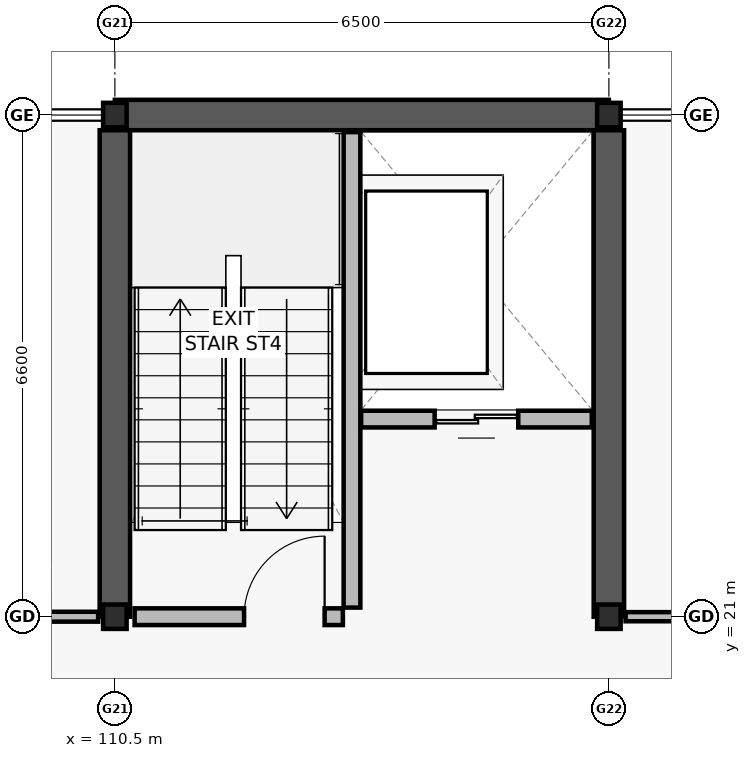
"""IFC4 building model, lengths in metres.
Left out: names, types, materials, properties, quantities, classifications, styles, units other than length and angle.
Written with IfcOpenShell. Run it as: python <this file> out.ifc"""

import sys

from ifc_helpers import new_model, si_unit, direction, frame, frame_2d, origin, origin_2d, place, context, subcontext, project, spatial, rectangle, i_section, extrude, element, fill, save


model = new_model("IFC4")
c1 = context("Model", 3, precision=1e-05, world=origin(), true_north=direction((0.0, 1.0)))
c2 = subcontext(c1, "Body", "Model", "MODEL_VIEW")
j1 = project(units=[si_unit("LENGTHUNIT", "METRE"), si_unit("PLANEANGLEUNIT", "RADIAN")], contexts=[c1])
p1 = place(None, origin())
s1 = spatial("IfcSite", under=j1, at=p1, CompositionType="ELEMENT")
p2 = place(p1, origin())
s2 = spatial("IfcBuilding", under=s1, at=p2, CompositionType="ELEMENT")
p3 = place(p2, frame((0.0, 0.0, 9.6)))
s3 = spatial("IfcBuildingStorey", under=s2, at=p3, CompositionType="ELEMENT", Elevation=9.6)
for number, where, z_axis, x_axis in (
    (1, (110.5, 21.0, 0.0), (0.0, 0.0, 1.0), (1.0, 0.0, 0.0)),
    (2, (110.5, 27.6, 0.0), (0.0, 0.0, 1.0), (1.0, 0.0, 0.0)),
    (3, (117.0, 21.0, 0.0), (0.0, 0.0, 1.0), (1.0, 0.0, 0.0)),
    (4, (117.0, 27.6, 0.0), (0.0, 0.0, 1.0), (1.0, 0.0, 0.0)),
):
    element("IfcColumn", number, at=place(p3, frame(where, z_axis=z_axis, x_axis=x_axis)), inside=s3, PredefinedType="COLUMN", context=c2, shape_type="SweptSolid", body=[
        extrude(i_section(OverallWidth=0.309, OverallDepth=0.321, WebThickness=0.014, FlangeThickness=0.022, FilletRadius=0.017, at=origin_2d()), origin(), (0.0, 0.0, 1.0), 3.9),
    ])
p4 = place(p3, frame((110.5, 27.6, 0.0), z_axis=(0.0, 0.0, 1.0), x_axis=(1.0, 0.0, 0.0)))
e5 = element("IfcWall", 5, at=p4, inside=s3, PredefinedType="SHEAR", context=c2, shape_type="SweptSolid", body=[
    extrude(rectangle(XDim=6.5, YDim=0.4, at=frame_2d((3.25, 0.0))), origin(), (0.0, 0.0, 1.0), 3.66),
])
for number, where, z_axis, x_axis in (
    (6, (110.5, 21.0, 0.0), (0.0, 0.0, 1.0), (0.0, 1.0, 0.0)),
    (7, (117.0, 21.0, 0.0), (0.0, 0.0, 1.0), (0.0, 1.0, 0.0)),
):
    element("IfcWall", number, at=place(p3, frame(where, z_axis=z_axis, x_axis=x_axis)), inside=s3, PredefinedType="SHEAR", context=c2, shape_type="SweptSolid", body=[
        extrude(rectangle(XDim=6.4, YDim=0.4, at=frame_2d((3.2, 0.0))), origin(), (0.0, 0.0, 1.0), 3.66),
    ])
p5 = place(p3, frame((113.62, 21.12, 0.0), z_axis=(0.0, 0.0, 1.0), x_axis=(0.0, 1.0, 0.0)))
e8 = element("IfcWall", 8, at=p5, inside=s3, PredefinedType="SOLIDWALL", context=c2, shape_type="SweptSolid", body=[
    extrude(rectangle(XDim=6.255, YDim=0.22, at=frame_2d((3.127, 0.0))), origin(), (0.0, 0.0, 1.0), 3.66),
])
p6 = place(p3, frame((110.76, 21.0, 0.0), z_axis=(0.0, 0.0, 1.0), x_axis=(1.0, 0.0, 0.0)))
e9 = element("IfcWall", 9, at=p6, inside=s3, PredefinedType="SOLIDWALL", context=c2, shape_type="SweptSolid", body=[
    extrude(rectangle(XDim=2.74, YDim=0.22, at=frame_2d((1.37, 0.0))), origin(), (0.0, 0.0, 1.0), 3.02),
])
p7 = place(p6, frame((1.44, 0.0, 0.0)))
e10 = element("IfcOpeningElement", 10, at=p7, cuts=e9, PredefinedType="OPENING", context=c2, shape_type="SweptSolid", body=[
    extrude(rectangle(XDim=1.06, YDim=2.1, at=frame_2d((0.53, 1.05))), frame((0.0, 0.12, 0.0), z_axis=(0.0, -1.0, 0.0), x_axis=(1.0, 0.0, 0.0)), (0.0, 0.0, 1.0), 0.24),
])
p8 = place(p3, frame((113.74, 23.6, 0.0), z_axis=(0.0, 0.0, 1.0), x_axis=(1.0, 0.0, 0.0)))
e11 = element("IfcWall", 11, at=p8, inside=s3, PredefinedType="SOLIDWALL", context=c2, shape_type="SweptSolid", body=[
    extrude(rectangle(XDim=3.035, YDim=0.22, at=frame_2d((1.518, 0.0))), origin(), (0.0, 0.0, 1.0), 3.66),
])
p9 = place(p8, frame((0.968, 0.0, 0.0)))
e12 = element("IfcOpeningElement", 12, at=p9, cuts=e11, PredefinedType="OPENING", context=c2, shape_type="SweptSolid", body=[
    extrude(rectangle(XDim=1.1, YDim=2.1, at=frame_2d((0.55, 1.05))), frame((0.0, 0.12, 0.0), z_axis=(0.0, -1.0, 0.0), x_axis=(1.0, 0.0, 0.0)), (0.0, 0.0, 1.0), 0.24),
])
p10 = place(p3, frame((104.22, 21.0, 0.0), z_axis=(0.0, 0.0, 1.0), x_axis=(1.0, 0.0, 0.0)))
e13 = element("IfcWall", 13, at=p10, inside=s3, PredefinedType="PARTITIONING", context=c2, shape_type="SweptSolid", body=[
    extrude(rectangle(XDim=6.06, YDim=0.13, at=frame_2d((3.03, 0.0))), origin(), (0.0, 0.0, 1.0), 3.0),
])
p11 = place(p10, frame((2.35, 0.0, 0.0)))
e14 = element("IfcOpeningElement", 14, at=p11, cuts=e13, PredefinedType="OPENING", context=c2, shape_type="SweptSolid", body=[
    extrude(rectangle(XDim=1.36, YDim=2.15, at=frame_2d((0.68, 1.075))), frame((0.0, 0.075, 0.0), z_axis=(0.0, -1.0, 0.0), x_axis=(1.0, 0.0, 0.0)), (0.0, 0.0, 1.0), 0.15),
])
p12 = place(p3, frame((117.22, 21.0, 0.0), z_axis=(0.0, 0.0, 1.0), x_axis=(1.0, 0.0, 0.0)))
e15 = element("IfcWall", 15, at=p12, inside=s3, PredefinedType="PARTITIONING", context=c2, shape_type="SweptSolid", body=[
    extrude(rectangle(XDim=3.67, YDim=0.12, at=frame_2d((1.835, 0.0))), origin(), (0.0, 0.0, 1.0), 3.0),
])
p13 = place(p12, frame((1.125, 0.0, 0.0)))
e16 = element("IfcOpeningElement", 16, at=p13, cuts=e15, PredefinedType="OPENING", context=c2, shape_type="SweptSolid", body=[
    extrude(rectangle(XDim=1.42, YDim=2.15, at=frame_2d((0.71, 1.075))), frame((0.0, 0.07, 0.0), z_axis=(0.0, -1.0, 0.0), x_axis=(1.0, 0.0, 0.0)), (0.0, 0.0, 1.0), 0.14),
])
p14 = place(p7, origin())
e17 = element("IfcDoor", 17, at=p14, inside=s3, OperationType="SINGLE_SWING_RIGHT", PredefinedType="DOOR", context=c2, shape_type="SweptSolid", body=[
    extrude(rectangle(XDim=1.06, YDim=2.1, at=frame_2d((0.53, 1.05))), frame((0.0, 0.025, 0.0), z_axis=(0.0, -1.0, 0.0), x_axis=(1.0, 0.0, 0.0)), (0.0, 0.0, 1.0), 0.05),
])
fill(e10, e17)
p15 = place(p9, origin())
e18 = element("IfcDoor", 18, at=p15, inside=s3, OperationType="DOUBLE_DOOR_SLIDING", PredefinedType="DOOR", context=c2, shape_type="SweptSolid", body=[
    extrude(rectangle(XDim=1.1, YDim=2.1, at=frame_2d((0.55, 1.05))), frame((0.0, 0.025, 0.0), z_axis=(0.0, -1.0, 0.0), x_axis=(1.0, 0.0, 0.0)), (0.0, 0.0, 1.0), 0.05),
])
fill(e12, e18)
save(model, sys.argv[1])
